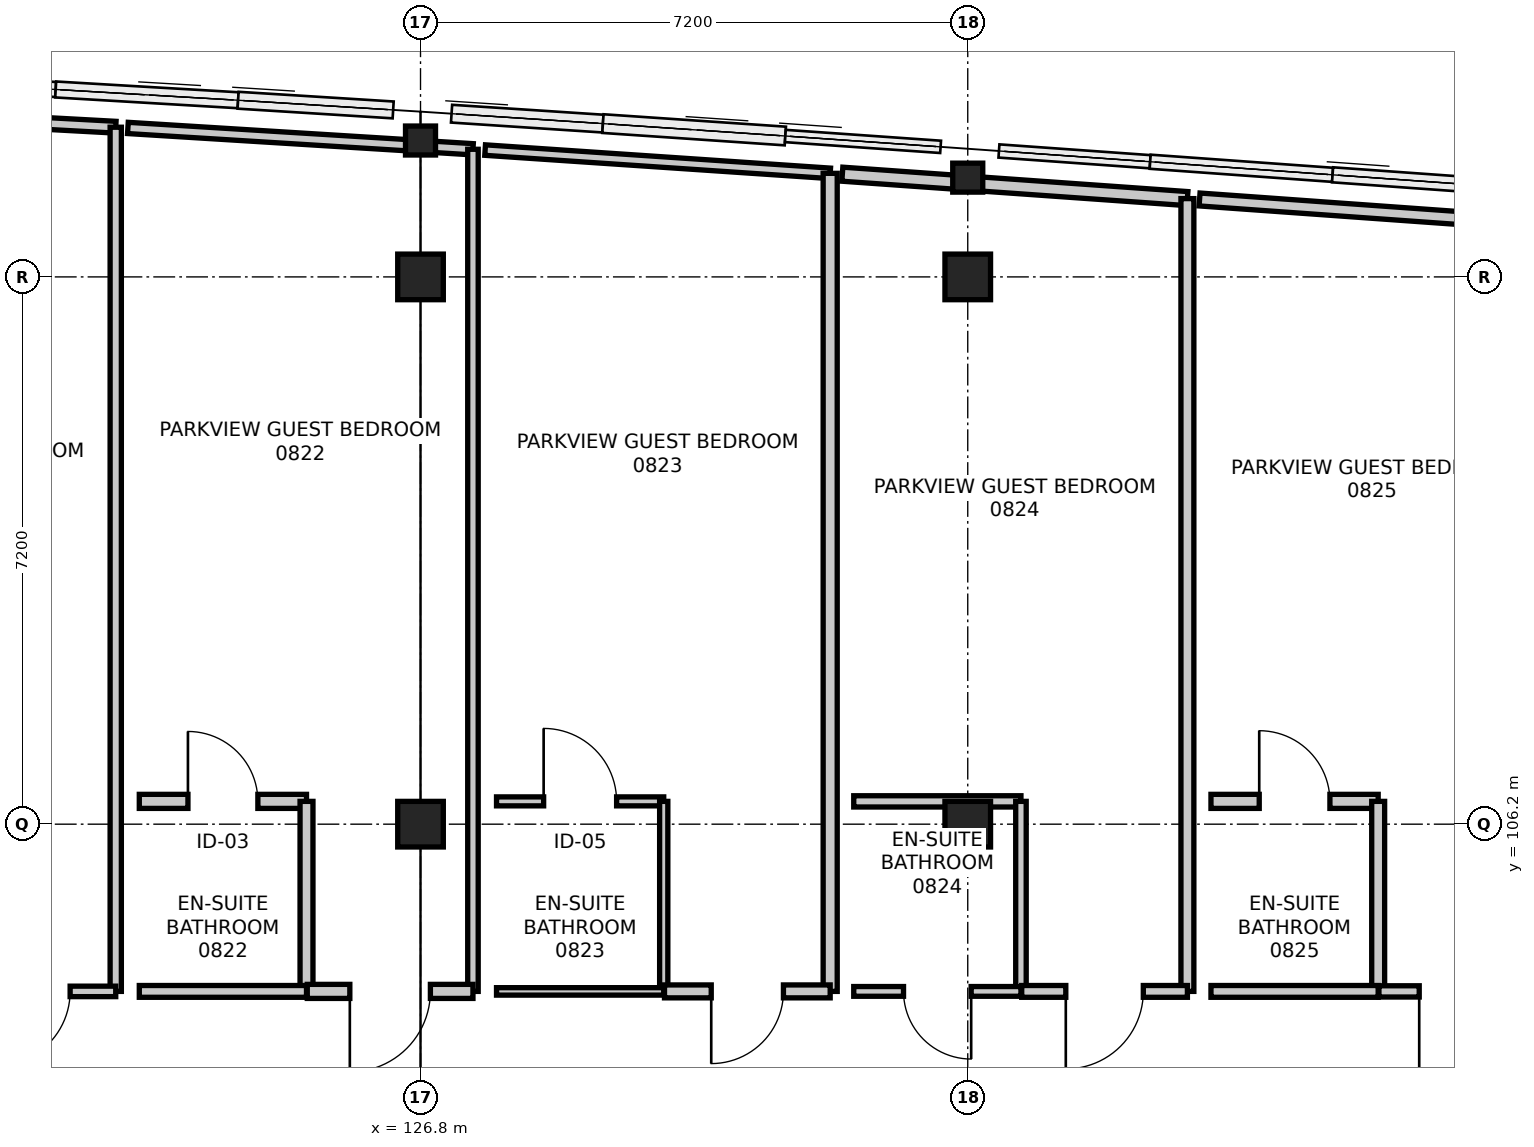
"""IFC4 building model, lengths in metres.
Left out: names, types, materials, properties, quantities, classifications, styles, units other than length and angle.
Written with IfcOpenShell. Run it as: python <this file> out.ifc"""

import sys

from ifc_helpers import new_model, si_unit, direction, frame, frame_2d, origin, origin_2d, place, context, subcontext, project, spatial, rectangle, i_section, extrude, element, fill, save


model = new_model("IFC4")
c1 = context("Model", 3, precision=1e-05, world=origin(), true_north=direction((0.0, 1.0)))
c2 = subcontext(c1, "Body", "Model", "MODEL_VIEW")
j1 = project(units=[si_unit("LENGTHUNIT", "METRE"), si_unit("PLANEANGLEUNIT", "RADIAN")], contexts=[c1])
p1 = place(None, origin())
s1 = spatial("IfcSite", under=j1, at=p1, CompositionType="ELEMENT")
p2 = place(p1, origin())
s2 = spatial("IfcBuilding", under=s1, at=p2, CompositionType="ELEMENT")
p3 = place(p2, frame((0.0, 0.0, 33.6)))
s3 = spatial("IfcBuildingStorey", under=s2, at=p3, CompositionType="ELEMENT", Elevation=33.6)
for number, where, z_axis, x_axis in (
    (1, (126.8, 106.2, 0.0), (0.0, 0.0, 1.0), (1.0, 0.0, 0.0)),
    (2, (126.8, 113.4, 0.0), (0.0, 0.0, 1.0), (1.0, 0.0, 0.0)),
):
    element("IfcColumn", number, at=place(p3, frame(where, z_axis=z_axis, x_axis=x_axis)), inside=s3, PredefinedType="COLUMN", context=c2, shape_type="SweptSolid", body=[
        extrude(rectangle(XDim=0.6, YDim=0.6, at=origin_2d()), origin(), (0.0, 0.0, 1.0), 3.6),
    ])
p4 = place(p3, frame((126.8, 115.194, 0.0), z_axis=(0.0, 0.0, 1.0), x_axis=(1.0, 0.0, 0.0)))
e3 = element("IfcColumn", 3, at=p4, inside=s3, PredefinedType="COLUMN", context=c2, shape_type="SweptSolid", body=[
    extrude(i_section(OverallWidth=0.395, OverallDepth=0.381, WebThickness=0.018, FlangeThickness=0.03, FilletRadius=0.015, at=origin_2d()), origin(), (0.0, 0.0, 1.0), 3.6),
])
for number, where, z_axis, x_axis in (
    (4, (134.0, 106.2, 0.0), (0.0, 0.0, 1.0), (1.0, 0.0, 0.0)),
    (5, (134.0, 113.4, 0.0), (0.0, 0.0, 1.0), (1.0, 0.0, 0.0)),
):
    element("IfcColumn", number, at=place(p3, frame(where, z_axis=z_axis, x_axis=x_axis)), inside=s3, PredefinedType="COLUMN", context=c2, shape_type="SweptSolid", body=[
        extrude(rectangle(XDim=0.6, YDim=0.6, at=origin_2d()), origin(), (0.0, 0.0, 1.0), 3.6),
    ])
p5 = place(p3, frame((134.0, 114.706, 0.0), z_axis=(0.0, 0.0, 1.0), x_axis=(1.0, 0.0, 0.0)))
e6 = element("IfcColumn", 6, at=p5, inside=s3, PredefinedType="COLUMN", context=c2, shape_type="SweptSolid", body=[
    extrude(i_section(OverallWidth=0.395, OverallDepth=0.381, WebThickness=0.018, FlangeThickness=0.03, FilletRadius=0.015, at=origin_2d()), origin(), (0.0, 0.0, 1.0), 3.6),
])
p6 = place(p3, frame((118.25, 115.615, 0.0), z_axis=(0.0, 0.0, 1.0), x_axis=(0.998531223826, -0.054179286128, 0.0)))
e7 = element("IfcWall", 7, at=p6, inside=s3, PredefinedType="PARTITIONING", context=c2, shape_type="SweptSolid", body=[
    extrude(rectangle(XDim=4.547, YDim=0.155, at=frame_2d((2.273, 0.0))), origin(), (0.0, 0.0, 1.0), 2.936),
])
p7 = place(p3, frame((122.79, 115.369, 0.0), z_axis=(0.0, 0.0, 1.0), x_axis=(0.0, -1.0, 0.0)))
e8 = element("IfcWall", 8, at=p7, inside=s3, PredefinedType="PARTITIONING", context=c2, shape_type="SweptSolid", body=[
    extrude(rectangle(XDim=11.369, YDim=0.148, at=frame_2d((5.685, 0.0))), origin(), (0.0, 0.0, 1.0), 2.745),
])
p8 = place(p3, frame((122.79, 104.0, 0.0), z_axis=(0.0, 0.0, 1.0), x_axis=(-1.0, 0.0, 0.0)))
e9 = element("IfcWall", 9, at=p8, inside=s3, PredefinedType="PARTITIONING", context=c2, shape_type="SweptSolid", body=[
    extrude(rectangle(XDim=2.18, YDim=0.138, at=frame_2d((1.09, 0.0))), origin(), (0.0, 0.0, 1.0), 3.36),
])
p9 = place(p8, frame((0.6, 0.0, 0.0)))
e10 = element("IfcOpeningElement", 10, at=p9, cuts=e9, PredefinedType="OPENING", context=c2, shape_type="SweptSolid", body=[
    extrude(rectangle(XDim=0.98, YDim=2.15, at=frame_2d((0.49, 1.075))), frame((0.0, 0.079, 0.0), z_axis=(0.0, -1.0, 0.0), x_axis=(1.0, 0.0, 0.0)), (0.0, 0.0, 1.0), 0.158),
])
p10 = place(p3, frame((123.1, 106.5, 0.0), z_axis=(0.0, 0.0, 1.0), x_axis=(1.0, 0.0, 0.0)))
e11 = element("IfcWall", 11, at=p10, inside=s3, PredefinedType="PARTITIONING", context=c2, shape_type="SweptSolid", body=[
    extrude(rectangle(XDim=2.2, YDim=0.185, at=frame_2d((1.1, 0.0))), origin(), (0.0, 0.0, 1.0), 2.745),
])
p11 = place(p10, frame((0.64, 0.0, 0.0)))
e12 = element("IfcOpeningElement", 12, at=p11, cuts=e11, PredefinedType="OPENING", context=c2, shape_type="SweptSolid", body=[
    extrude(rectangle(XDim=0.92, YDim=2.1, at=frame_2d((0.46, 1.05))), frame((0.0, 0.103, 0.0), z_axis=(0.0, -1.0, 0.0), x_axis=(1.0, 0.0, 0.0)), (0.0, 0.0, 1.0), 0.205),
])
p12 = place(p3, frame((125.3, 106.5, 0.0), z_axis=(0.0, 0.0, 1.0), x_axis=(0.0, -1.0, 0.0)))
e13 = element("IfcWall", 13, at=p12, inside=s3, PredefinedType="PARTITIONING", context=c2, shape_type="SweptSolid", body=[
    extrude(rectangle(XDim=2.5, YDim=0.17, at=frame_2d((1.25, 0.0))), origin(), (0.0, 0.0, 1.0), 2.745),
])
p13 = place(p3, frame((125.3, 104.0, 0.0), z_axis=(0.0, 0.0, 1.0), x_axis=(-1.0, 0.0, 0.0)))
e14 = element("IfcWall", 14, at=p13, inside=s3, PredefinedType="PARTITIONING", context=c2, shape_type="SweptSolid", body=[
    extrude(rectangle(XDim=2.2, YDim=0.155, at=frame_2d((1.1, 0.0))), origin(), (0.0, 0.0, 1.0), 3.36),
])
p14 = place(p3, frame((122.95, 115.36, 0.0), z_axis=(0.0, 0.0, 1.0), x_axis=(0.99809329669, -0.061723343256, 0.0)))
e15 = element("IfcWall", 15, at=p14, inside=s3, PredefinedType="PARTITIONING", context=c2, shape_type="SweptSolid", body=[
    extrude(rectangle(XDim=4.549, YDim=0.148, at=frame_2d((2.274, 0.0))), origin(), (0.0, 0.0, 1.0), 2.936),
])
p15 = place(p3, frame((127.49, 115.079, 0.0), z_axis=(0.0, 0.0, 1.0), x_axis=(0.0, -1.0, 0.0)))
e16 = element("IfcWall", 16, at=p15, inside=s3, PredefinedType="PARTITIONING", context=c2, shape_type="SweptSolid", body=[
    extrude(rectangle(XDim=11.079, YDim=0.138, at=frame_2d((5.54, 0.0))), origin(), (0.0, 0.0, 1.0), 2.745),
])
p16 = place(p3, frame((127.49, 104.0, 0.0), z_axis=(0.0, 0.0, 1.0), x_axis=(-1.0, 0.0, 0.0)))
e17 = element("IfcWall", 17, at=p16, inside=s3, PredefinedType="PARTITIONING", context=c2, shape_type="SweptSolid", body=[
    extrude(rectangle(XDim=2.18, YDim=0.185, at=frame_2d((1.09, 0.0))), origin(), (0.0, 0.0, 1.0), 2.695),
])
p17 = place(p16, frame((0.56, 0.0, 0.0)))
e18 = element("IfcOpeningElement", 18, at=p17, cuts=e17, PredefinedType="OPENING", context=c2, shape_type="SweptSolid", body=[
    extrude(rectangle(XDim=1.06, YDim=2.2, at=frame_2d((0.53, 1.1))), frame((0.0, 0.103, 0.0), z_axis=(0.0, -1.0, 0.0), x_axis=(1.0, 0.0, 0.0)), (0.0, 0.0, 1.0), 0.205),
])
p18 = place(p3, frame((127.8, 106.5, 0.0), z_axis=(0.0, 0.0, 1.0), x_axis=(1.0, 0.0, 0.0)))
e19 = element("IfcWall", 19, at=p18, inside=s3, PredefinedType="PARTITIONING", context=c2, shape_type="SweptSolid", body=[
    extrude(rectangle(XDim=2.2, YDim=0.118, at=frame_2d((1.1, 0.0))), origin(), (0.0, 0.0, 1.0), 3.36),
])
p19 = place(p18, frame((0.62, 0.0, 0.0)))
e20 = element("IfcOpeningElement", 20, at=p19, cuts=e19, PredefinedType="OPENING", context=c2, shape_type="SweptSolid", body=[
    extrude(rectangle(XDim=0.96, YDim=2.14, at=frame_2d((0.48, 1.07))), frame((0.0, 0.069, 0.0), z_axis=(0.0, -1.0, 0.0), x_axis=(1.0, 0.0, 0.0)), (0.0, 0.0, 1.0), 0.138),
])
p20 = place(p3, frame((130.0, 106.5, 0.0), z_axis=(0.0, 0.0, 1.0), x_axis=(0.0, -1.0, 0.0)))
e21 = element("IfcWall", 21, at=p20, inside=s3, PredefinedType="PARTITIONING", context=c2, shape_type="SweptSolid", body=[
    extrude(rectangle(XDim=2.5, YDim=0.108, at=frame_2d((1.25, 0.0))), origin(), (0.0, 0.0, 1.0), 2.745),
])
p21 = place(p3, frame((130.0, 104.0, 0.0), z_axis=(0.0, 0.0, 1.0), x_axis=(-1.0, 0.0, 0.0)))
e22 = element("IfcWall", 22, at=p21, inside=s3, PredefinedType="PARTITIONING", context=c2, shape_type="SweptSolid", body=[
    extrude(rectangle(XDim=2.2, YDim=0.098, at=frame_2d((1.1, 0.0))), origin(), (0.0, 0.0, 1.0), 3.36),
])
p22 = place(p3, frame((127.65, 115.069, 0.0), z_axis=(0.0, 0.0, 1.0), x_axis=(0.997734062526, -0.06728105584, 0.0)))
e23 = element("IfcWall", 23, at=p22, inside=s3, PredefinedType="PARTITIONING", context=c2, shape_type="SweptSolid", body=[
    extrude(rectangle(XDim=4.55, YDim=0.138, at=frame_2d((2.275, 0.0))), origin(), (0.0, 0.0, 1.0), 2.936),
])
p23 = place(p3, frame((132.19, 114.762, 0.0), z_axis=(0.0, 0.0, 1.0), x_axis=(0.0, -1.0, 0.0)))
e24 = element("IfcWall", 24, at=p23, inside=s3, PredefinedType="PARTITIONING", context=c2, shape_type="SweptSolid", body=[
    extrude(rectangle(XDim=10.762, YDim=0.185, at=frame_2d((5.381, 0.0))), origin(), (0.0, 0.0, 1.0), 2.745),
])
p24 = place(p3, frame((132.19, 104.0, 0.0), z_axis=(0.0, 0.0, 1.0), x_axis=(-1.0, 0.0, 0.0)))
e25 = element("IfcWall", 25, at=p24, inside=s3, PredefinedType="PARTITIONING", context=c2, shape_type="SweptSolid", body=[
    extrude(rectangle(XDim=2.18, YDim=0.17, at=frame_2d((1.09, 0.0))), origin(), (0.0, 0.0, 1.0), 3.36),
])
p25 = place(p24, frame((0.615, 0.0, 0.0)))
e26 = element("IfcOpeningElement", 26, at=p25, cuts=e25, PredefinedType="OPENING", context=c2, shape_type="SweptSolid", body=[
    extrude(rectangle(XDim=0.95, YDim=2.1, at=frame_2d((0.475, 1.05))), frame((0.0, 0.095, 0.0), z_axis=(0.0, -1.0, 0.0), x_axis=(1.0, 0.0, 0.0)), (0.0, 0.0, 1.0), 0.19),
])
p26 = place(p3, frame((132.5, 106.5, 0.0), z_axis=(0.0, 0.0, 1.0), x_axis=(1.0, 0.0, 0.0)))
e27 = element("IfcWall", 27, at=p26, inside=s3, PredefinedType="PARTITIONING", context=c2, shape_type="SweptSolid", body=[
    extrude(rectangle(XDim=2.2, YDim=0.148, at=frame_2d((1.1, 0.0))), origin(), (0.0, 0.0, 1.0), 2.695),
])
p27 = place(p3, frame((134.7, 106.5, 0.0), z_axis=(0.0, 0.0, 1.0), x_axis=(0.0, -1.0, 0.0)))
e28 = element("IfcWall", 28, at=p27, inside=s3, PredefinedType="PARTITIONING", context=c2, shape_type="SweptSolid", body=[
    extrude(rectangle(XDim=2.5, YDim=0.138, at=frame_2d((1.25, 0.0))), origin(), (0.0, 0.0, 1.0), 2.745),
])
p28 = place(p3, frame((134.7, 104.0, 0.0), z_axis=(0.0, 0.0, 1.0), x_axis=(-1.0, 0.0, 0.0)))
e29 = element("IfcWall", 29, at=p28, inside=s3, PredefinedType="PARTITIONING", context=c2, shape_type="SweptSolid", body=[
    extrude(rectangle(XDim=2.2, YDim=0.128, at=frame_2d((1.1, 0.0))), origin(), (0.0, 0.0, 1.0), 2.695),
])
p29 = place(p28, frame((0.655, 0.0, 0.0)))
e30 = element("IfcOpeningElement", 30, at=p29, cuts=e29, PredefinedType="OPENING", context=c2, shape_type="SweptSolid", body=[
    extrude(rectangle(XDim=0.89, YDim=2.09, at=frame_2d((0.445, 1.045))), frame((0.0, 0.074, 0.0), z_axis=(0.0, -1.0, 0.0), x_axis=(1.0, 0.0, 0.0)), (0.0, 0.0, 1.0), 0.148),
])
p30 = place(p3, frame((132.35, 114.751, 0.0), z_axis=(0.0, 0.0, 1.0), x_axis=(0.997508826773, -0.070541764303, 0.0)))
e31 = element("IfcWall", 31, at=p30, inside=s3, PredefinedType="PARTITIONING", context=c2, shape_type="SweptSolid", body=[
    extrude(rectangle(XDim=4.551, YDim=0.185, at=frame_2d((2.275, 0.0))), origin(), (0.0, 0.0, 1.0), 2.936),
])
p31 = place(p3, frame((136.89, 114.43, 0.0), z_axis=(0.0, 0.0, 1.0), x_axis=(0.0, -1.0, 0.0)))
e32 = element("IfcWall", 32, at=p31, inside=s3, PredefinedType="PARTITIONING", context=c2, shape_type="SweptSolid", body=[
    extrude(rectangle(XDim=10.43, YDim=0.17, at=frame_2d((5.215, 0.0))), origin(), (0.0, 0.0, 1.0), 2.745),
])
p32 = place(p3, frame((136.89, 104.0, 0.0), z_axis=(0.0, 0.0, 1.0), x_axis=(-1.0, 0.0, 0.0)))
e33 = element("IfcWall", 33, at=p32, inside=s3, PredefinedType="PARTITIONING", context=c2, shape_type="SweptSolid", body=[
    extrude(rectangle(XDim=2.18, YDim=0.155, at=frame_2d((1.09, 0.0))), origin(), (0.0, 0.0, 1.0), 3.36),
])
p33 = place(p32, frame((0.58, 0.0, 0.0)))
e34 = element("IfcOpeningElement", 34, at=p33, cuts=e33, PredefinedType="OPENING", context=c2, shape_type="SweptSolid", body=[
    extrude(rectangle(XDim=1.02, YDim=2.15, at=frame_2d((0.51, 1.075))), frame((0.0, 0.087, 0.0), z_axis=(0.0, -1.0, 0.0), x_axis=(1.0, 0.0, 0.0)), (0.0, 0.0, 1.0), 0.175),
])
p34 = place(p3, frame((137.2, 106.5, 0.0), z_axis=(0.0, 0.0, 1.0), x_axis=(1.0, 0.0, 0.0)))
e35 = element("IfcWall", 35, at=p34, inside=s3, PredefinedType="PARTITIONING", context=c2, shape_type="SweptSolid", body=[
    extrude(rectangle(XDim=2.2, YDim=0.185, at=frame_2d((1.1, 0.0))), origin(), (0.0, 0.0, 1.0), 2.745),
])
p35 = place(p34, frame((0.635, 0.0, 0.0)))
e36 = element("IfcOpeningElement", 36, at=p35, cuts=e35, PredefinedType="OPENING", context=c2, shape_type="SweptSolid", body=[
    extrude(rectangle(XDim=0.93, YDim=2.13, at=frame_2d((0.465, 1.065))), frame((0.0, 0.103, 0.0), z_axis=(0.0, -1.0, 0.0), x_axis=(1.0, 0.0, 0.0)), (0.0, 0.0, 1.0), 0.205),
])
p36 = place(p3, frame((139.4, 106.5, 0.0), z_axis=(0.0, 0.0, 1.0), x_axis=(0.0, -1.0, 0.0)))
e37 = element("IfcWall", 37, at=p36, inside=s3, PredefinedType="PARTITIONING", context=c2, shape_type="SweptSolid", body=[
    extrude(rectangle(XDim=2.5, YDim=0.17, at=frame_2d((1.25, 0.0))), origin(), (0.0, 0.0, 1.0), 2.745),
])
p37 = place(p3, frame((139.4, 104.0, 0.0), z_axis=(0.0, 0.0, 1.0), x_axis=(-1.0, 0.0, 0.0)))
e38 = element("IfcWall", 38, at=p37, inside=s3, PredefinedType="PARTITIONING", context=c2, shape_type="SweptSolid", body=[
    extrude(rectangle(XDim=2.2, YDim=0.155, at=frame_2d((1.1, 0.0))), origin(), (0.0, 0.0, 1.0), 3.36),
])
p38 = place(p3, frame((137.05, 114.419, 0.0), z_axis=(0.0, 0.0, 1.0), x_axis=(0.997448342938, -0.071391898497, 0.0)))
e39 = element("IfcWall", 39, at=p38, inside=s3, PredefinedType="PARTITIONING", context=c2, shape_type="SweptSolid", body=[
    extrude(rectangle(XDim=4.552, YDim=0.17, at=frame_2d((2.276, 0.0))), origin(), (0.0, 0.0, 1.0), 2.936),
])
p39 = place(p3, frame((141.59, 104.0, 0.0), z_axis=(0.0, 0.0, 1.0), x_axis=(-1.0, 0.0, 0.0)))
e40 = element("IfcWall", 40, at=p39, inside=s3, PredefinedType="PARTITIONING", context=c2, shape_type="SweptSolid", body=[
    extrude(rectangle(XDim=2.18, YDim=0.148, at=frame_2d((1.09, 0.0))), origin(), (0.0, 0.0, 1.0), 2.695),
])
p40 = place(p39, frame((0.53, 0.0, 0.0)))
e41 = element("IfcOpeningElement", 41, at=p40, cuts=e40, PredefinedType="OPENING", context=c2, shape_type="SweptSolid", body=[
    extrude(rectangle(XDim=1.12, YDim=2.2, at=frame_2d((0.56, 1.1))), frame((0.0, 0.084, 0.0), z_axis=(0.0, -1.0, 0.0), x_axis=(1.0, 0.0, 0.0)), (0.0, 0.0, 1.0), 0.168),
])
p41 = place(p9, origin())
e42 = element("IfcDoor", 42, at=p41, inside=s3, OperationType="SINGLE_SWING_RIGHT", PredefinedType="DOOR", context=c2, shape_type="SweptSolid", body=[
    extrude(rectangle(XDim=0.98, YDim=2.15, at=frame_2d((0.49, 1.075))), frame((0.0, 0.025, 0.0), z_axis=(0.0, -1.0, 0.0), x_axis=(1.0, 0.0, 0.0)), (0.0, 0.0, 1.0), 0.05),
])
fill(e10, e42)
p42 = place(p11, origin())
e43 = element("IfcDoor", 43, at=p42, inside=s3, OperationType="SINGLE_SWING_LEFT", PredefinedType="DOOR", context=c2, shape_type="SweptSolid", body=[
    extrude(rectangle(XDim=0.92, YDim=2.1, at=frame_2d((0.46, 1.05))), frame((0.0, 0.025, 0.0), z_axis=(0.0, -1.0, 0.0), x_axis=(1.0, 0.0, 0.0)), (0.0, 0.0, 1.0), 0.05),
])
fill(e12, e43)
p43 = place(p17, origin())
e44 = element("IfcDoor", 44, at=p43, inside=s3, OperationType="SINGLE_SWING_RIGHT", PredefinedType="DOOR", context=c2, shape_type="SweptSolid", body=[
    extrude(rectangle(XDim=1.06, YDim=2.2, at=frame_2d((0.53, 1.1))), frame((0.0, 0.025, 0.0), z_axis=(0.0, -1.0, 0.0), x_axis=(1.0, 0.0, 0.0)), (0.0, 0.0, 1.0), 0.05),
])
fill(e18, e44)
p44 = place(p19, origin())
e45 = element("IfcDoor", 45, at=p44, inside=s3, OperationType="SINGLE_SWING_LEFT", PredefinedType="DOOR", context=c2, shape_type="SweptSolid", body=[
    extrude(rectangle(XDim=0.96, YDim=2.14, at=frame_2d((0.48, 1.07))), frame((0.0, 0.025, 0.0), z_axis=(0.0, -1.0, 0.0), x_axis=(1.0, 0.0, 0.0)), (0.0, 0.0, 1.0), 0.05),
])
fill(e20, e45)
p45 = place(p25, origin())
e46 = element("IfcDoor", 46, at=p45, inside=s3, OperationType="SINGLE_SWING_RIGHT", PredefinedType="DOOR", context=c2, shape_type="SweptSolid", body=[
    extrude(rectangle(XDim=0.95, YDim=2.1, at=frame_2d((0.475, 1.05))), frame((0.0, 0.025, 0.0), z_axis=(0.0, -1.0, 0.0), x_axis=(1.0, 0.0, 0.0)), (0.0, 0.0, 1.0), 0.05),
])
fill(e26, e46)
p46 = place(p29, origin())
e47 = element("IfcDoor", 47, at=p46, inside=s3, OperationType="SINGLE_SWING_LEFT", PredefinedType="DOOR", context=c2, shape_type="SweptSolid", body=[
    extrude(rectangle(XDim=0.89, YDim=2.09, at=frame_2d((0.445, 1.045))), frame((0.0, 0.025, 0.0), z_axis=(0.0, -1.0, 0.0), x_axis=(1.0, 0.0, 0.0)), (0.0, 0.0, 1.0), 0.05),
])
fill(e30, e47)
p47 = place(p33, origin())
e48 = element("IfcDoor", 48, at=p47, inside=s3, OperationType="SINGLE_SWING_RIGHT", PredefinedType="DOOR", context=c2, shape_type="SweptSolid", body=[
    extrude(rectangle(XDim=1.02, YDim=2.15, at=frame_2d((0.51, 1.075))), frame((0.0, 0.025, 0.0), z_axis=(0.0, -1.0, 0.0), x_axis=(1.0, 0.0, 0.0)), (0.0, 0.0, 1.0), 0.05),
])
fill(e34, e48)
p48 = place(p35, origin())
e49 = element("IfcDoor", 49, at=p48, inside=s3, OperationType="SINGLE_SWING_LEFT", PredefinedType="DOOR", context=c2, shape_type="SweptSolid", body=[
    extrude(rectangle(XDim=0.93, YDim=2.13, at=frame_2d((0.465, 1.065))), frame((0.0, 0.025, 0.0), z_axis=(0.0, -1.0, 0.0), x_axis=(1.0, 0.0, 0.0)), (0.0, 0.0, 1.0), 0.05),
])
fill(e36, e49)
p49 = place(p40, origin())
e50 = element("IfcDoor", 50, at=p49, inside=s3, OperationType="SINGLE_SWING_RIGHT", PredefinedType="DOOR", context=c2, shape_type="SweptSolid", body=[
    extrude(rectangle(XDim=1.12, YDim=2.2, at=frame_2d((0.56, 1.1))), frame((0.0, 0.025, 0.0), z_axis=(0.0, -1.0, 0.0), x_axis=(1.0, 0.0, 0.0)), (0.0, 0.0, 1.0), 0.05),
])
fill(e41, e50)
save(model, sys.argv[1])
